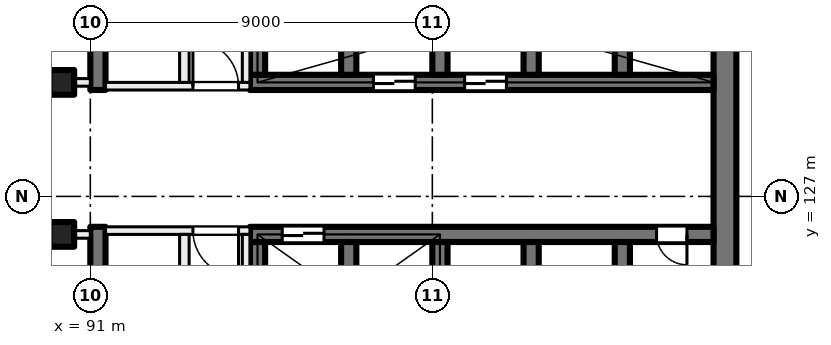
"""IFC4 building model, lengths in metres.
Left out: names, types, materials, properties, quantities, classifications, styles, units other than length and angle.
Written with IfcOpenShell. Run it as: python <this file> out.ifc"""

import sys

from ifc_helpers import new_model, si_unit, direction, frame, frame_2d, origin, origin_2d, place, context, subcontext, project, spatial, rectangle, extrude, element, fill, save


model = new_model("IFC4")
c1 = context("Model", 3, precision=1e-05, world=origin(), true_north=direction((0.0, 1.0)))
c2 = subcontext(c1, "Body", "Model", "MODEL_VIEW")
j1 = project(units=[si_unit("LENGTHUNIT", "METRE"), si_unit("PLANEANGLEUNIT", "RADIAN")], contexts=[c1])
p1 = place(None, origin())
s1 = spatial("IfcSite", under=j1, at=p1, CompositionType="ELEMENT")
p2 = place(p1, origin())
s2 = spatial("IfcBuilding", under=s1, at=p2, CompositionType="ELEMENT")
p3 = place(p2, frame((0.0, 0.0, 105.0)))
s3 = spatial("IfcBuildingStorey", under=s2, at=p3, CompositionType="ELEMENT", Elevation=105.0)
for number, where, z_axis, x_axis in (
    (1, (90.25, 130.0, 0.0), (0.0, 0.0, 1.0), (1.0, 0.0, 0.0)),
    (2, (90.25, 126.0, 0.0), (0.0, 0.0, 1.0), (1.0, 0.0, 0.0)),
):
    element("IfcColumn", number, at=place(p3, frame(where, z_axis=z_axis, x_axis=x_axis)), inside=s3, PredefinedType="COLUMN", context=c2, shape_type="SweptSolid", body=[
        extrude(rectangle(XDim=0.65, YDim=0.65, at=origin_2d()), origin(), (0.0, 0.0, 1.0), 4.0),
    ])
p4 = place(p3, frame((107.7, 135.2, 0.0), z_axis=(0.0, 0.0, 1.0), x_axis=(0.0, -1.0, 0.0)))
e3 = element("IfcWall", 3, at=p4, inside=s3, PredefinedType="SHEAR", context=c2, shape_type="SweptSolid", body=[
    extrude(rectangle(XDim=14.4, YDim=0.6, at=frame_2d((7.2, 0.0))), origin(), (0.0, 0.0, 1.0), 4.0),
])
p5 = place(p3, frame((107.4, 130.0, 0.0), z_axis=(0.0, 0.0, 1.0), x_axis=(-1.0, 0.0, 0.0)))
e4 = element("IfcWall", 4, at=p5, inside=s3, PredefinedType="SHEAR", context=c2, shape_type="SweptSolid", body=[
    extrude(rectangle(XDim=12.2, YDim=0.4, at=frame_2d((6.1, 0.0))), origin(), (0.0, 0.0, 1.0), 4.0),
])
p6 = place(p5, frame((5.45, 0.0, 0.0)))
e5 = element("IfcOpeningElement", 5, at=p6, cuts=e4, PredefinedType="OPENING", context=c2, shape_type="SweptSolid", body=[
    extrude(rectangle(XDim=1.1, YDim=2.1, at=frame_2d((0.55, 1.05))), frame((0.0, 0.21, 0.0), z_axis=(0.0, -1.0, 0.0), x_axis=(1.0, 0.0, 0.0)), (0.0, 0.0, 1.0), 0.42),
])
p7 = place(p5, frame((7.85, 0.0, 0.0)))
e6 = element("IfcOpeningElement", 6, at=p7, cuts=e4, PredefinedType="OPENING", context=c2, shape_type="SweptSolid", body=[
    extrude(rectangle(XDim=1.1, YDim=2.1, at=frame_2d((0.55, 1.05))), frame((0.0, 0.21, 0.0), z_axis=(0.0, -1.0, 0.0), x_axis=(1.0, 0.0, 0.0)), (0.0, 0.0, 1.0), 0.42),
])
for number, where, z_axis, x_axis in (
    (7, (105.0, 133.2, 0.0), (0.0, 0.0, 1.0), (0.0, -1.0, 0.0)),
    (8, (102.6, 133.2, 0.0), (0.0, 0.0, 1.0), (0.0, -1.0, 0.0)),
    (9, (100.2, 133.2, 0.0), (0.0, 0.0, 1.0), (0.0, -1.0, 0.0)),
    (10, (97.8, 133.2, 0.0), (0.0, 0.0, 1.0), (0.0, -1.0, 0.0)),
    (11, (95.4, 133.2, 0.0), (0.0, 0.0, 1.0), (0.0, -1.0, 0.0)),
):
    element("IfcWall", number, at=place(p3, frame(where, z_axis=z_axis, x_axis=x_axis)), inside=s3, PredefinedType="SHEAR", context=c2, shape_type="SweptSolid", body=[
        extrude(rectangle(XDim=3.0, YDim=0.4, at=frame_2d((1.5, 0.0))), origin(), (0.0, 0.0, 1.0), 4.0),
    ])
p8 = place(p3, frame((107.4, 126.0, 0.0), z_axis=(0.0, 0.0, 1.0), x_axis=(-1.0, 0.0, 0.0)))
e12 = element("IfcWall", 12, at=p8, inside=s3, PredefinedType="SHEAR", context=c2, shape_type="SweptSolid", body=[
    extrude(rectangle(XDim=12.2, YDim=0.4, at=frame_2d((6.1, 0.0))), origin(), (0.0, 0.0, 1.0), 4.0),
])
p9 = place(p8, frame((10.25, 0.0, 0.0)))
e13 = element("IfcOpeningElement", 13, at=p9, cuts=e12, PredefinedType="OPENING", context=c2, shape_type="SweptSolid", body=[
    extrude(rectangle(XDim=1.1, YDim=2.1, at=frame_2d((0.55, 1.05))), frame((0.0, 0.21, 0.0), z_axis=(0.0, -1.0, 0.0), x_axis=(1.0, 0.0, 0.0)), (0.0, 0.0, 1.0), 0.42),
])
p10 = place(p8, frame((0.7, 0.0, 0.0)))
e14 = element("IfcOpeningElement", 14, at=p10, cuts=e12, PredefinedType="OPENING", context=c2, shape_type="SweptSolid", body=[
    extrude(rectangle(XDim=0.8, YDim=2.1, at=frame_2d((0.4, 1.05))), frame((0.0, 0.21, 0.0), z_axis=(0.0, -1.0, 0.0), x_axis=(1.0, 0.0, 0.0)), (0.0, 0.0, 1.0), 0.42),
])
for number, where, z_axis, x_axis in (
    (15, (105.0, 125.8, 0.0), (0.0, 0.0, 1.0), (0.0, -1.0, 0.0)),
    (16, (102.6, 125.8, 0.0), (0.0, 0.0, 1.0), (0.0, -1.0, 0.0)),
    (17, (100.2, 125.8, 0.0), (0.0, 0.0, 1.0), (0.0, -1.0, 0.0)),
    (18, (97.8, 125.8, 0.0), (0.0, 0.0, 1.0), (0.0, -1.0, 0.0)),
    (19, (95.4, 125.8, 0.0), (0.0, 0.0, 1.0), (0.0, -1.0, 0.0)),
):
    element("IfcWall", number, at=place(p3, frame(where, z_axis=z_axis, x_axis=x_axis)), inside=s3, PredefinedType="SHEAR", context=c2, shape_type="SweptSolid", body=[
        extrude(rectangle(XDim=3.0, YDim=0.4, at=frame_2d((1.5, 0.0))), origin(), (0.0, 0.0, 1.0), 4.0),
    ])
for number, where, z_axis, x_axis in (
    (20, (91.2, 138.4, 0.0), (0.0, 0.0, 1.0), (0.0, -1.0, 0.0)),
    (21, (91.2, 126.2, 0.0), (0.0, 0.0, 1.0), (0.0, -1.0, 0.0)),
):
    element("IfcWall", number, at=place(p3, frame(where, z_axis=z_axis, x_axis=x_axis)), inside=s3, PredefinedType="SHEAR", context=c2, shape_type="SweptSolid", body=[
        extrude(rectangle(XDim=8.6, YDim=0.4, at=frame_2d((4.3, 0.0))), origin(), (0.0, 0.0, 1.0), 4.0),
    ])
p11 = place(p3, frame((95.2, 126.1, 0.0), z_axis=(0.0, 0.0, 1.0), x_axis=(-1.0, 0.0, 0.0)))
e22 = element("IfcWall", 22, at=p11, inside=s3, PredefinedType="PARTITIONING", context=c2, shape_type="SweptSolid", body=[
    extrude(rectangle(XDim=3.8, YDim=0.2, at=frame_2d((1.9, 0.0))), origin(), (0.0, 0.0, 1.0), 3.625),
])
p12 = place(p11, frame((0.3, 0.0, 0.0)))
e23 = element("IfcOpeningElement", 23, at=p12, cuts=e22, PredefinedType="OPENING", context=c2, shape_type="SweptSolid", body=[
    extrude(rectangle(XDim=1.2, YDim=2.1, at=frame_2d((0.6, 1.05))), frame((0.0, 0.11, 0.0), z_axis=(0.0, -1.0, 0.0), x_axis=(1.0, 0.0, 0.0)), (0.0, 0.0, 1.0), 0.22),
])
p13 = place(p3, frame((95.1, 117.6, 0.0), z_axis=(0.0, 0.0, 1.0), x_axis=(0.0, 1.0, 0.0)))
e24 = element("IfcWall", 24, at=p13, inside=s3, PredefinedType="PARTITIONING", context=c2, shape_type="SweptSolid", body=[
    extrude(rectangle(XDim=8.4, YDim=0.2, at=frame_2d((4.2, 0.0))), origin(), (0.0, 0.0, 1.0), 3.625),
])
p14 = place(p13, frame((1.65, 0.0, 0.0)))
e25 = element("IfcOpeningElement", 25, at=p14, cuts=e24, PredefinedType="OPENING", context=c2, shape_type="SweptSolid", body=[
    extrude(rectangle(XDim=1.5, YDim=2.1, at=frame_2d((0.75, 1.05))), frame((0.0, 0.11, 0.0), z_axis=(0.0, -1.0, 0.0), x_axis=(1.0, 0.0, 0.0)), (0.0, 0.0, 1.0), 0.22),
])
p15 = place(p3, frame((93.475, 117.6, 0.0), z_axis=(0.0, 0.0, 1.0), x_axis=(0.0, 1.0, 0.0)))
e26 = element("IfcWall", 26, at=p15, inside=s3, PredefinedType="PARTITIONING", context=c2, shape_type="SweptSolid", body=[
    extrude(rectangle(XDim=8.4, YDim=0.25, at=frame_2d((4.2, 0.0))), origin(), (0.0, 0.0, 1.0), 3.625),
])
p16 = place(p15, frame((6.525, 0.0, 0.0)))
e27 = element("IfcOpeningElement", 27, at=p16, cuts=e26, PredefinedType="OPENING", context=c2, shape_type="SweptSolid", body=[
    extrude(rectangle(XDim=1.0, YDim=2.1, at=frame_2d((0.5, 1.05))), frame((0.0, 0.135, 0.0), z_axis=(0.0, -1.0, 0.0), x_axis=(1.0, 0.0, 0.0)), (0.0, 0.0, 1.0), 0.27),
])
p17 = place(p15, frame((2.275, 0.0, 0.0)))
e28 = element("IfcOpeningElement", 28, at=p17, cuts=e26, PredefinedType="OPENING", context=c2, shape_type="SweptSolid", body=[
    extrude(rectangle(XDim=1.0, YDim=2.1, at=frame_2d((0.5, 1.05))), frame((0.0, 0.135, 0.0), z_axis=(0.0, -1.0, 0.0), x_axis=(1.0, 0.0, 0.0)), (0.0, 0.0, 1.0), 0.27),
])
p18 = place(p3, frame((91.4, 129.9, 0.0), z_axis=(0.0, 0.0, 1.0), x_axis=(1.0, 0.0, 0.0)))
e29 = element("IfcWall", 29, at=p18, inside=s3, PredefinedType="PARTITIONING", context=c2, shape_type="SweptSolid", body=[
    extrude(rectangle(XDim=3.8, YDim=0.2, at=frame_2d((1.9, 0.0))), origin(), (0.0, 0.0, 1.0), 3.625),
])
p19 = place(p18, frame((2.3, 0.0, 0.0)))
e30 = element("IfcOpeningElement", 30, at=p19, cuts=e29, PredefinedType="OPENING", context=c2, shape_type="SweptSolid", body=[
    extrude(rectangle(XDim=1.2, YDim=2.1, at=frame_2d((0.6, 1.05))), frame((0.0, 0.11, 0.0), z_axis=(0.0, -1.0, 0.0), x_axis=(1.0, 0.0, 0.0)), (0.0, 0.0, 1.0), 0.22),
])
p20 = place(p3, frame((95.1, 130.0, 0.0), z_axis=(0.0, 0.0, 1.0), x_axis=(0.0, 1.0, 0.0)))
e31 = element("IfcWall", 31, at=p20, inside=s3, PredefinedType="PARTITIONING", context=c2, shape_type="SweptSolid", body=[
    extrude(rectangle(XDim=8.4, YDim=0.2, at=frame_2d((4.2, 0.0))), origin(), (0.0, 0.0, 1.0), 3.625),
])
p21 = place(p20, frame((5.25, 0.0, 0.0)))
e32 = element("IfcOpeningElement", 32, at=p21, cuts=e31, PredefinedType="OPENING", context=c2, shape_type="SweptSolid", body=[
    extrude(rectangle(XDim=1.5, YDim=2.1, at=frame_2d((0.75, 1.05))), frame((0.0, 0.11, 0.0), z_axis=(0.0, -1.0, 0.0), x_axis=(1.0, 0.0, 0.0)), (0.0, 0.0, 1.0), 0.22),
])
p22 = place(p3, frame((93.475, 130.0, 0.0), z_axis=(0.0, 0.0, 1.0), x_axis=(0.0, 1.0, 0.0)))
e33 = element("IfcWall", 33, at=p22, inside=s3, PredefinedType="PARTITIONING", context=c2, shape_type="SweptSolid", body=[
    extrude(rectangle(XDim=8.4, YDim=0.25, at=frame_2d((4.2, 0.0))), origin(), (0.0, 0.0, 1.0), 3.625),
])
p23 = place(p22, frame((3.8, 0.0, 0.0)))
e34 = element("IfcOpeningElement", 34, at=p23, cuts=e33, PredefinedType="OPENING", context=c2, shape_type="SweptSolid", body=[
    extrude(rectangle(XDim=0.8, YDim=2.1, at=frame_2d((0.4, 1.05))), frame((0.0, 0.135, 0.0), z_axis=(0.0, -1.0, 0.0), x_axis=(1.0, 0.0, 0.0)), (0.0, 0.0, 1.0), 0.27),
])
p24 = place(p3, frame((91.0, 126.0, 0.0), z_axis=(0.0, 0.0, 1.0), x_axis=(-1.0, 0.0, 0.0)))
e35 = element("IfcWall", 35, at=p24, inside=s3, PredefinedType="PARTITIONING", context=c2, shape_type="SweptSolid", body=[
    extrude(rectangle(XDim=38.595, YDim=0.2, at=frame_2d((19.297, 0.0))), origin(), (0.0, 0.0, 1.0), 3.625),
])
p25 = place(p24, frame((30.421, 0.0, 0.0)))
e36 = element("IfcOpeningElement", 36, at=p25, cuts=e35, PredefinedType="OPENING", context=c2, shape_type="SweptSolid", body=[
    extrude(rectangle(XDim=1.0, YDim=2.1, at=frame_2d((0.5, 1.05))), frame((0.0, 0.11, 0.0), z_axis=(0.0, -1.0, 0.0), x_axis=(1.0, 0.0, 0.0)), (0.0, 0.0, 1.0), 0.22),
])
p26 = place(p24, frame((20.5, 0.0, 0.0)))
e37 = element("IfcOpeningElement", 37, at=p26, cuts=e35, PredefinedType="OPENING", context=c2, shape_type="SweptSolid", body=[
    extrude(rectangle(XDim=1.0, YDim=2.1, at=frame_2d((0.5, 1.05))), frame((0.0, 0.11, 0.0), z_axis=(0.0, -1.0, 0.0), x_axis=(1.0, 0.0, 0.0)), (0.0, 0.0, 1.0), 0.22),
])
p27 = place(p24, frame((13.75, 0.0, 0.0)))
e38 = element("IfcOpeningElement", 38, at=p27, cuts=e35, PredefinedType="OPENING", context=c2, shape_type="SweptSolid", body=[
    extrude(rectangle(XDim=1.0, YDim=2.1, at=frame_2d((0.5, 1.05))), frame((0.0, 0.11, 0.0), z_axis=(0.0, -1.0, 0.0), x_axis=(1.0, 0.0, 0.0)), (0.0, 0.0, 1.0), 0.22),
])
p28 = place(p24, frame((4.377, 0.0, 0.0)))
e39 = element("IfcOpeningElement", 39, at=p28, cuts=e35, PredefinedType="OPENING", context=c2, shape_type="SweptSolid", body=[
    extrude(rectangle(XDim=1.0, YDim=2.1, at=frame_2d((0.5, 1.05))), frame((0.0, 0.11, 0.0), z_axis=(0.0, -1.0, 0.0), x_axis=(1.0, 0.0, 0.0)), (0.0, 0.0, 1.0), 0.22),
])
p29 = place(p3, frame((72.4, 130.0, 0.0), z_axis=(0.0, 0.0, 1.0), x_axis=(1.0, 0.0, 0.0)))
e40 = element("IfcWall", 40, at=p29, inside=s3, PredefinedType="PARTITIONING", context=c2, shape_type="SweptSolid", body=[
    extrude(rectangle(XDim=18.6, YDim=0.2, at=frame_2d((9.3, 0.0))), origin(), (0.0, 0.0, 1.0), 3.625),
])
p30 = place(p29, frame((1.677, 0.0, 0.0)))
e41 = element("IfcOpeningElement", 41, at=p30, cuts=e40, PredefinedType="OPENING", context=c2, shape_type="SweptSolid", body=[
    extrude(rectangle(XDim=1.0, YDim=2.1, at=frame_2d((0.5, 1.05))), frame((0.0, 0.11, 0.0), z_axis=(0.0, -1.0, 0.0), x_axis=(1.0, 0.0, 0.0)), (0.0, 0.0, 1.0), 0.22),
])
p31 = place(p29, frame((6.1, 0.0, 0.0)))
e42 = element("IfcOpeningElement", 42, at=p31, cuts=e40, PredefinedType="OPENING", context=c2, shape_type="SweptSolid", body=[
    extrude(rectangle(XDim=1.0, YDim=2.1, at=frame_2d((0.5, 1.05))), frame((0.0, 0.11, 0.0), z_axis=(0.0, -1.0, 0.0), x_axis=(1.0, 0.0, 0.0)), (0.0, 0.0, 1.0), 0.22),
])
p32 = place(p29, frame((13.223, 0.0, 0.0)))
e43 = element("IfcOpeningElement", 43, at=p32, cuts=e40, PredefinedType="OPENING", context=c2, shape_type="SweptSolid", body=[
    extrude(rectangle(XDim=1.0, YDim=2.1, at=frame_2d((0.5, 1.05))), frame((0.0, 0.11, 0.0), z_axis=(0.0, -1.0, 0.0), x_axis=(1.0, 0.0, 0.0)), (0.0, 0.0, 1.0), 0.22),
])
p33 = place(p9, origin())
e44 = element("IfcDoor", 44, at=p33, inside=s3, OperationType="DOUBLE_DOOR_SLIDING", PredefinedType="DOOR", context=c2, shape_type="SweptSolid", body=[
    extrude(rectangle(XDim=1.1, YDim=2.1, at=frame_2d((0.55, 1.05))), frame((0.0, 0.025, 0.0), z_axis=(0.0, -1.0, 0.0), x_axis=(1.0, 0.0, 0.0)), (0.0, 0.0, 1.0), 0.05),
])
fill(e13, e44)
p34 = place(p6, origin())
e45 = element("IfcDoor", 45, at=p34, inside=s3, OperationType="DOUBLE_DOOR_SLIDING", PredefinedType="DOOR", context=c2, shape_type="SweptSolid", body=[
    extrude(rectangle(XDim=1.1, YDim=2.1, at=frame_2d((0.55, 1.05))), frame((0.0, 0.025, 0.0), z_axis=(0.0, -1.0, 0.0), x_axis=(1.0, 0.0, 0.0)), (0.0, 0.0, 1.0), 0.05),
])
fill(e5, e45)
p35 = place(p7, origin())
e46 = element("IfcDoor", 46, at=p35, inside=s3, OperationType="DOUBLE_DOOR_SLIDING", PredefinedType="DOOR", context=c2, shape_type="SweptSolid", body=[
    extrude(rectangle(XDim=1.1, YDim=2.1, at=frame_2d((0.55, 1.05))), frame((0.0, 0.025, 0.0), z_axis=(0.0, -1.0, 0.0), x_axis=(1.0, 0.0, 0.0)), (0.0, 0.0, 1.0), 0.05),
])
fill(e6, e46)
p36 = place(p10, origin())
e47 = element("IfcDoor", 47, at=p36, inside=s3, OperationType="SINGLE_SWING_LEFT", PredefinedType="DOOR", context=c2, shape_type="SweptSolid", body=[
    extrude(rectangle(XDim=0.8, YDim=2.1, at=frame_2d((0.4, 1.05))), frame((0.0, 0.025, 0.0), z_axis=(0.0, -1.0, 0.0), x_axis=(1.0, 0.0, 0.0)), (0.0, 0.0, 1.0), 0.05),
])
fill(e14, e47)
p37 = place(p12, origin())
e48 = element("IfcDoor", 48, at=p37, inside=s3, OperationType="DOUBLE_DOOR_SINGLE_SWING", PredefinedType="DOOR", context=c2, shape_type="SweptSolid", body=[
    extrude(rectangle(XDim=1.2, YDim=2.1, at=frame_2d((0.6, 1.05))), frame((0.0, 0.025, 0.0), z_axis=(0.0, -1.0, 0.0), x_axis=(1.0, 0.0, 0.0)), (0.0, 0.0, 1.0), 0.05),
])
fill(e23, e48)
p38 = place(p19, origin())
e49 = element("IfcDoor", 49, at=p38, inside=s3, OperationType="DOUBLE_DOOR_SINGLE_SWING", PredefinedType="DOOR", context=c2, shape_type="SweptSolid", body=[
    extrude(rectangle(XDim=1.2, YDim=2.1, at=frame_2d((0.6, 1.05))), frame((0.0, 0.025, 0.0), z_axis=(0.0, -1.0, 0.0), x_axis=(1.0, 0.0, 0.0)), (0.0, 0.0, 1.0), 0.05),
])
fill(e30, e49)
save(model, sys.argv[1])
